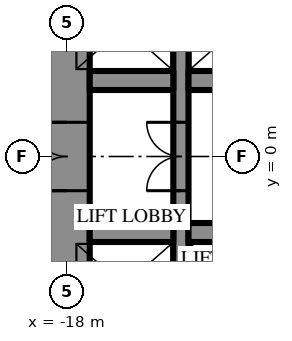
"""IFC4 building model, lengths in metres.
Left out: names, types, materials, properties, quantities, classifications, styles, units other than length and angle.
Written with IfcOpenShell. Run it as: python <this file> out.ifc"""

import sys

from ifc_helpers import new_model, si_unit, direction, frame, frame_2d, origin, place, context, subcontext, project, spatial, rectangle, extrude, element, fill, save


model = new_model("IFC4")
c1 = context("Model", 3, precision=1e-05, world=origin(), true_north=direction((0.0, 1.0)))
c2 = subcontext(c1, "Body", "Model", "MODEL_VIEW")
j1 = project(units=[si_unit("LENGTHUNIT", "METRE"), si_unit("PLANEANGLEUNIT", "RADIAN")], contexts=[c1])
p1 = place(None, origin())
s1 = spatial("IfcSite", under=j1, at=p1, CompositionType="ELEMENT")
p2 = place(p1, origin())
s2 = spatial("IfcBuilding", under=s1, at=p2, CompositionType="ELEMENT")
p3 = place(p2, frame((0.0, 0.0, 103.3)))
s3 = spatial("IfcBuildingStorey", under=s2, at=p3, CompositionType="ELEMENT", Elevation=103.3)
p4 = place(p3, frame((-18.0, 10.7, 0.0), z_axis=(0.0, 0.0, 1.0), x_axis=(0.0, -1.0, 0.0)))
e1 = element("IfcWall", 1, at=p4, inside=s3, PredefinedType="SHEAR", context=c2, shape_type="SweptSolid", body=[
    extrude(rectangle(XDim=21.4, YDim=1.2, at=frame_2d((10.7, 0.0))), origin(), (0.0, 0.0, 1.0), 4.2),
])
p5 = place(p4, frame((9.8, 0.0, 0.0)))
e2 = element("IfcOpeningElement", 2, at=p5, cuts=e1, PredefinedType="OPENING", context=c2, shape_type="SweptSolid", body=[
    extrude(rectangle(XDim=1.8, YDim=2.4, at=frame_2d((0.9, 1.2))), frame((0.0, 0.61, 0.0), z_axis=(0.0, -1.0, 0.0), x_axis=(1.0, 0.0, 0.0)), (0.0, 0.0, 1.0), 1.22),
])
p6 = place(p3, frame((-15.0, -10.7, 0.0), z_axis=(0.0, 0.0, 1.0), x_axis=(0.0, 1.0, 0.0)))
e3 = element("IfcWall", 3, at=p6, inside=s3, PredefinedType="SHEAR", context=c2, shape_type="SweptSolid", body=[
    extrude(rectangle(XDim=21.4, YDim=0.4, at=frame_2d((10.7, 0.0))), origin(), (0.0, 0.0, 1.0), 4.2),
])
p7 = place(p6, frame((9.8, 0.0, 0.0)))
e4 = element("IfcOpeningElement", 4, at=p7, cuts=e3, PredefinedType="OPENING", context=c2, shape_type="SweptSolid", body=[
    extrude(rectangle(XDim=1.8, YDim=2.4, at=frame_2d((0.9, 1.2))), frame((0.0, 0.21, 0.0), z_axis=(0.0, -1.0, 0.0), x_axis=(1.0, 0.0, 0.0)), (0.0, 0.0, 1.0), 0.42),
])
p8 = place(p3, frame((-17.4, 2.0, 0.0), z_axis=(0.0, 0.0, 1.0), x_axis=(1.0, 0.0, 0.0)))
e5 = element("IfcWall", 5, at=p8, inside=s3, PredefinedType="SHEAR", context=c2, shape_type="SweptSolid", body=[
    extrude(rectangle(XDim=2.2, YDim=0.5, at=frame_2d((1.1, 0.0))), origin(), (0.0, 0.0, 1.0), 4.2),
])
for number, where, z_axis, x_axis in (
    (6, (-14.8, 2.0, 0.0), (0.0, 0.0, 1.0), (1.0, 0.0, 0.0)),
    (7, (-12.3, -2.0, 0.0), (0.0, 0.0, 1.0), (-1.0, 0.0, 0.0)),
):
    element("IfcWall", number, at=place(p3, frame(where, z_axis=z_axis, x_axis=x_axis)), inside=s3, PredefinedType="SHEAR", context=c2, shape_type="SweptSolid", body=[
        extrude(rectangle(XDim=2.5, YDim=0.5, at=frame_2d((1.25, 0.0))), origin(), (0.0, 0.0, 1.0), 4.2),
    ])
p9 = place(p3, frame((-15.2, -2.0, 0.0), z_axis=(0.0, 0.0, 1.0), x_axis=(-1.0, 0.0, 0.0)))
e8 = element("IfcWall", 8, at=p9, inside=s3, PredefinedType="SHEAR", context=c2, shape_type="SweptSolid", body=[
    extrude(rectangle(XDim=2.2, YDim=0.5, at=frame_2d((1.1, 0.0))), origin(), (0.0, 0.0, 1.0), 4.2),
])
p10 = place(p5, frame((1.8, 0.0, 0.0), z_axis=(0.0, 0.0, 1.0), x_axis=(-1.0, 0.0, 0.0)))
e9 = element("IfcDoor", 9, at=p10, inside=s3, OperationType="DOUBLE_DOOR_SINGLE_SWING", PredefinedType="DOOR", context=c2, shape_type="SweptSolid", body=[
    extrude(rectangle(XDim=1.8, YDim=2.4, at=frame_2d((0.9, 1.2))), frame((0.0, 0.025, 0.0), z_axis=(0.0, -1.0, 0.0), x_axis=(1.0, 0.0, 0.0)), (0.0, 0.0, 1.0), 0.05),
])
fill(e2, e9)
p11 = place(p7, origin())
e10 = element("IfcDoor", 10, at=p11, inside=s3, OperationType="DOUBLE_DOOR_SINGLE_SWING", PredefinedType="DOOR", context=c2, shape_type="SweptSolid", body=[
    extrude(rectangle(XDim=1.8, YDim=2.4, at=frame_2d((0.9, 1.2))), frame((0.0, 0.025, 0.0), z_axis=(0.0, -1.0, 0.0), x_axis=(1.0, 0.0, 0.0)), (0.0, 0.0, 1.0), 0.05),
])
fill(e4, e10)
save(model, sys.argv[1])
